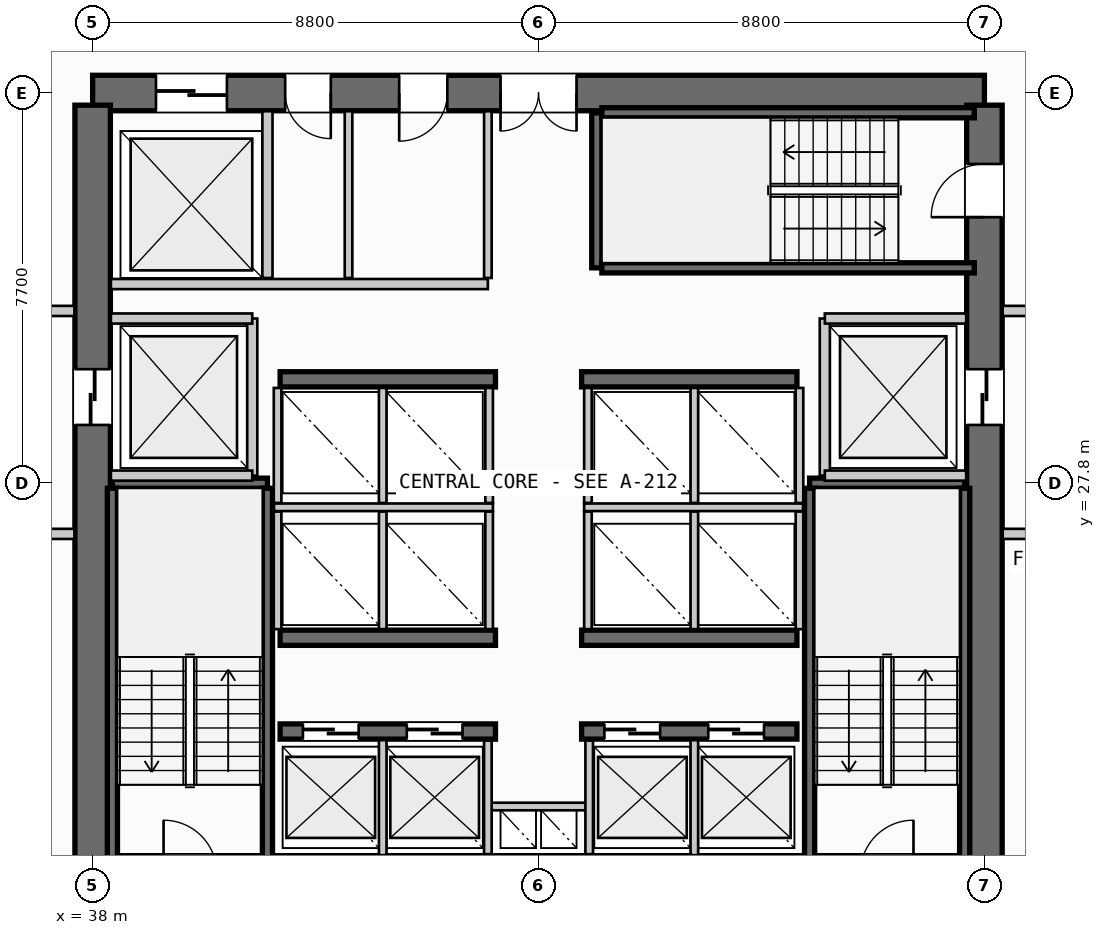
"""IFC4 building model, lengths in metres.
Left out: names, types, materials, properties, quantities, classifications, styles, units other than length and angle.
Written with IfcOpenShell. Run it as: python <this file> out.ifc"""

import sys

from ifc_helpers import new_model, si_unit, direction, frame, frame_2d, origin, place, context, subcontext, project, spatial, rectangle, extrude, source, transform, mapped, element, fill, save


model = new_model("IFC4")
c1 = context("Model", 3, precision=1e-05, world=origin(), true_north=direction((0.0, 1.0)))
c2 = subcontext(c1, "Body", "Model", "MODEL_VIEW")
j1 = project(units=[si_unit("LENGTHUNIT", "METRE"), si_unit("PLANEANGLEUNIT", "RADIAN")], contexts=[c1])
p1 = place(None, origin())
s1 = spatial("IfcSite", under=j1, at=p1, CompositionType="ELEMENT")
p2 = place(p1, origin())
s2 = spatial("IfcBuilding", under=s1, at=p2, CompositionType="ELEMENT")
p3 = place(p2, frame((0.0, 0.0, 89.2)))
s3 = spatial("IfcBuildingStorey", under=s2, at=p3, CompositionType="ELEMENT", Elevation=89.2)
p4 = place(p3, frame((38.0, 20.1, 0.0), z_axis=(0.0, 0.0, 1.0), x_axis=(1.0, 0.0, 0.0)))
e1 = element("IfcWall", 1, at=p4, inside=s3, PredefinedType="SHEAR", context=c2, shape_type="SweptSolid", body=[
    extrude(rectangle(XDim=17.6, YDim=0.7, at=frame_2d((8.8, 0.0))), origin(), (0.0, 0.0, 1.0), 3.35),
])
p5 = place(p4, frame((1.4, 0.0, 0.0)))
e2 = element("IfcOpeningElement", 2, at=p5, cuts=e1, PredefinedType="OPENING", context=c2, shape_type="SweptSolid", body=[
    extrude(rectangle(XDim=1.05, YDim=2.15, at=frame_2d((0.525, 1.075))), frame((0.0, 0.36, 0.0), z_axis=(0.0, -1.0, 0.0), x_axis=(1.0, 0.0, 0.0)), (0.0, 0.0, 1.0), 0.72),
])
p6 = place(p4, frame((15.15, 0.0, 0.0)))
e3 = element("IfcOpeningElement", 3, at=p6, cuts=e1, PredefinedType="OPENING", context=c2, shape_type="SweptSolid", body=[
    extrude(rectangle(XDim=1.05, YDim=2.15, at=frame_2d((0.525, 1.075))), frame((0.0, 0.36, 0.0), z_axis=(0.0, -1.0, 0.0), x_axis=(1.0, 0.0, 0.0)), (0.0, 0.0, 1.0), 0.72),
])
p7 = place(p3, frame((55.6, 35.5, 0.0), z_axis=(0.0, 0.0, 1.0), x_axis=(-1.0, 0.0, 0.0)))
e4 = element("IfcWall", 4, at=p7, inside=s3, PredefinedType="SHEAR", context=c2, shape_type="SweptSolid", body=[
    extrude(rectangle(XDim=17.6, YDim=0.7, at=frame_2d((8.8, 0.0))), origin(), (0.0, 0.0, 1.0), 3.35),
])
p8 = place(p7, frame((8.05, 0.0, 0.0)))
e5 = element("IfcOpeningElement", 5, at=p8, cuts=e4, PredefinedType="OPENING", context=c2, shape_type="SweptSolid", body=[
    extrude(rectangle(XDim=1.5, YDim=2.2, at=frame_2d((0.75, 1.1))), frame((0.0, 0.36, 0.0), z_axis=(0.0, -1.0, 0.0), x_axis=(1.0, 0.0, 0.0)), (0.0, 0.0, 1.0), 0.72),
])
p9 = place(p7, frame((14.95, 0.0, 0.0)))
e6 = element("IfcOpeningElement", 6, at=p9, cuts=e4, PredefinedType="OPENING", context=c2, shape_type="SweptSolid", body=[
    extrude(rectangle(XDim=1.4, YDim=2.3, at=frame_2d((0.7, 1.15))), frame((0.0, 0.36, 0.0), z_axis=(0.0, -1.0, 0.0), x_axis=(1.0, 0.0, 0.0)), (0.0, 0.0, 1.0), 0.72),
])
p10 = place(p7, frame((12.9, 0.0, 0.0)))
e7 = element("IfcOpeningElement", 7, at=p10, cuts=e4, PredefinedType="OPENING", context=c2, shape_type="SweptSolid", body=[
    extrude(rectangle(XDim=0.9, YDim=2.15, at=frame_2d((0.45, 1.075))), frame((0.0, 0.36, 0.0), z_axis=(0.0, -1.0, 0.0), x_axis=(1.0, 0.0, 0.0)), (0.0, 0.0, 1.0), 0.72),
])
p11 = place(p7, frame((10.6, 0.0, 0.0)))
e8 = element("IfcOpeningElement", 8, at=p11, cuts=e4, PredefinedType="OPENING", context=c2, shape_type="SweptSolid", body=[
    extrude(rectangle(XDim=0.95, YDim=2.15, at=frame_2d((0.475, 1.075))), frame((0.0, 0.36, 0.0), z_axis=(0.0, -1.0, 0.0), x_axis=(1.0, 0.0, 0.0)), (0.0, 0.0, 1.0), 0.72),
])
p12 = place(p3, frame((38.0, 35.26, 0.0), z_axis=(0.0, 0.0, 1.0), x_axis=(0.0, -1.0, 0.0)))
e9 = element("IfcWall", 9, at=p12, inside=s3, PredefinedType="SHEAR", context=c2, shape_type="SweptSolid", body=[
    extrude(rectangle(XDim=14.92, YDim=0.7, at=frame_2d((7.46, 0.0))), origin(), (0.0, 0.0, 1.0), 3.35),
])
p13 = place(p12, frame((5.21, 0.0, 0.0)))
e10 = element("IfcOpeningElement", 10, at=p13, cuts=e9, PredefinedType="OPENING", context=c2, shape_type="SweptSolid", body=[
    extrude(rectangle(XDim=1.1, YDim=2.2, at=frame_2d((0.55, 1.1))), frame((0.0, 0.36, 0.0), z_axis=(0.0, -1.0, 0.0), x_axis=(1.0, 0.0, 0.0)), (0.0, 0.0, 1.0), 0.72),
])
p14 = place(p3, frame((55.6, 20.34, 0.0), z_axis=(0.0, 0.0, 1.0), x_axis=(0.0, 1.0, 0.0)))
e11 = element("IfcWall", 11, at=p14, inside=s3, PredefinedType="SHEAR", context=c2, shape_type="SweptSolid", body=[
    extrude(rectangle(XDim=14.92, YDim=0.7, at=frame_2d((7.46, 0.0))), origin(), (0.0, 0.0, 1.0), 3.35),
])
p15 = place(p14, frame((12.71, 0.0, 0.0)))
e12 = element("IfcOpeningElement", 12, at=p15, cuts=e11, PredefinedType="OPENING", context=c2, shape_type="SweptSolid", body=[
    extrude(rectangle(XDim=1.05, YDim=2.15, at=frame_2d((0.525, 1.075))), frame((0.0, 0.36, 0.0), z_axis=(0.0, -1.0, 0.0), x_axis=(1.0, 0.0, 0.0)), (0.0, 0.0, 1.0), 0.72),
])
p16 = place(p14, frame((8.61, 0.0, 0.0)))
e13 = element("IfcOpeningElement", 13, at=p16, cuts=e11, PredefinedType="OPENING", context=c2, shape_type="SweptSolid", body=[
    extrude(rectangle(XDim=1.1, YDim=2.2, at=frame_2d((0.55, 1.1))), frame((0.0, 0.36, 0.0), z_axis=(0.0, -1.0, 0.0), x_axis=(1.0, 0.0, 0.0)), (0.0, 0.0, 1.0), 0.72),
])
p17 = place(p3, frame((41.7, 22.9, 0.0), z_axis=(0.0, 0.0, 1.0), x_axis=(1.0, 0.0, 0.0)))
e14 = element("IfcWall", 14, at=p17, inside=s3, PredefinedType="SHEAR", context=c2, shape_type="SweptSolid", body=[
    extrude(rectangle(XDim=4.25, YDim=0.3, at=frame_2d((2.125, 0.0))), origin(), (0.0, 0.0, 1.0), 3.35),
])
p18 = place(p17, frame((0.45, 0.0, 0.0)))
e15 = element("IfcOpeningElement", 15, at=p18, cuts=e14, PredefinedType="OPENING", context=c2, shape_type="SweptSolid", body=[
    extrude(rectangle(XDim=1.1, YDim=2.2, at=frame_2d((0.55, 1.1))), frame((0.0, 0.16, 0.0), z_axis=(0.0, -1.0, 0.0), x_axis=(1.0, 0.0, 0.0)), (0.0, 0.0, 1.0), 0.32),
])
p19 = place(p17, frame((2.5, 0.0, 0.0)))
e16 = element("IfcOpeningElement", 16, at=p19, cuts=e14, PredefinedType="OPENING", context=c2, shape_type="SweptSolid", body=[
    extrude(rectangle(XDim=1.1, YDim=2.2, at=frame_2d((0.55, 1.1))), frame((0.0, 0.16, 0.0), z_axis=(0.0, -1.0, 0.0), x_axis=(1.0, 0.0, 0.0)), (0.0, 0.0, 1.0), 0.32),
])
p20 = place(p3, frame((47.65, 22.9, 0.0), z_axis=(0.0, 0.0, 1.0), x_axis=(1.0, 0.0, 0.0)))
e17 = element("IfcWall", 17, at=p20, inside=s3, PredefinedType="SHEAR", context=c2, shape_type="SweptSolid", body=[
    extrude(rectangle(XDim=4.25, YDim=0.3, at=frame_2d((2.125, 0.0))), origin(), (0.0, 0.0, 1.0), 3.35),
])
p21 = place(p20, frame((0.45, 0.0, 0.0)))
e18 = element("IfcOpeningElement", 18, at=p21, cuts=e17, PredefinedType="OPENING", context=c2, shape_type="SweptSolid", body=[
    extrude(rectangle(XDim=1.1, YDim=2.2, at=frame_2d((0.55, 1.1))), frame((0.0, 0.16, 0.0), z_axis=(0.0, -1.0, 0.0), x_axis=(1.0, 0.0, 0.0)), (0.0, 0.0, 1.0), 0.32),
])
p22 = place(p20, frame((2.5, 0.0, 0.0)))
e19 = element("IfcOpeningElement", 19, at=p22, cuts=e17, PredefinedType="OPENING", context=c2, shape_type="SweptSolid", body=[
    extrude(rectangle(XDim=1.1, YDim=2.2, at=frame_2d((0.55, 1.1))), frame((0.0, 0.16, 0.0), z_axis=(0.0, -1.0, 0.0), x_axis=(1.0, 0.0, 0.0)), (0.0, 0.0, 1.0), 0.32),
])
for number, where, z_axis, x_axis in (
    (20, (41.7, 24.75, 0.0), (0.0, 0.0, 1.0), (1.0, 0.0, 0.0)),
    (21, (47.65, 24.75, 0.0), (0.0, 0.0, 1.0), (1.0, 0.0, 0.0)),
    (22, (41.7, 29.85, 0.0), (0.0, 0.0, 1.0), (1.0, 0.0, 0.0)),
    (23, (47.65, 29.85, 0.0), (0.0, 0.0, 1.0), (1.0, 0.0, 0.0)),
):
    element("IfcWall", number, at=place(p3, frame(where, z_axis=z_axis, x_axis=x_axis)), inside=s3, PredefinedType="SHEAR", context=c2, shape_type="SweptSolid", body=[
        extrude(rectangle(XDim=4.25, YDim=0.3, at=frame_2d((2.125, 0.0))), origin(), (0.0, 0.0, 1.0), 3.35),
    ])
p23 = place(p3, frame((38.39, 27.8, 0.0), z_axis=(0.0, 0.0, 1.0), x_axis=(1.0, 0.0, 0.0)))
e24 = element("IfcWall", 24, at=p23, inside=s3, PredefinedType="SHEAR", context=c2, shape_type="SweptSolid", body=[
    extrude(rectangle(XDim=3.06, YDim=0.2, at=frame_2d((1.53, 0.0))), origin(), (0.0, 0.0, 1.0), 3.35),
])
for number, where, z_axis, x_axis in (
    (25, (41.45, 27.7, 0.0), (0.0, 0.0, 1.0), (0.0, -1.0, 0.0)),
    (26, (38.39, 20.35, 0.0), (0.0, 0.0, 1.0), (0.0, 1.0, 0.0)),
):
    element("IfcWall", number, at=place(p3, frame(where, z_axis=z_axis, x_axis=x_axis)), inside=s3, PredefinedType="SHEAR", context=c2, shape_type="SweptSolid", body=[
        extrude(rectangle(XDim=7.35, YDim=0.2, at=frame_2d((3.675, 0.0))), origin(), (0.0, 0.0, 1.0), 3.35),
    ])
p24 = place(p3, frame((52.15, 27.8, 0.0), z_axis=(0.0, 0.0, 1.0), x_axis=(1.0, 0.0, 0.0)))
e27 = element("IfcWall", 27, at=p24, inside=s3, PredefinedType="SHEAR", context=c2, shape_type="SweptSolid", body=[
    extrude(rectangle(XDim=3.06, YDim=0.2, at=frame_2d((1.53, 0.0))), origin(), (0.0, 0.0, 1.0), 3.35),
])
for number, where, z_axis, x_axis in (
    (28, (55.21, 27.7, 0.0), (0.0, 0.0, 1.0), (0.0, -1.0, 0.0)),
    (29, (52.15, 20.35, 0.0), (0.0, 0.0, 1.0), (0.0, 1.0, 0.0)),
):
    element("IfcWall", number, at=place(p3, frame(where, z_axis=z_axis, x_axis=x_axis)), inside=s3, PredefinedType="SHEAR", context=c2, shape_type="SweptSolid", body=[
        extrude(rectangle(XDim=7.35, YDim=0.2, at=frame_2d((3.675, 0.0))), origin(), (0.0, 0.0, 1.0), 3.35),
    ])
p25 = place(p3, frame((47.95, 32.05, 0.0), z_axis=(0.0, 0.0, 1.0), x_axis=(0.0, 1.0, 0.0)))
e30 = element("IfcWall", 30, at=p25, inside=s3, PredefinedType="SHEAR", context=c2, shape_type="SweptSolid", body=[
    extrude(rectangle(XDim=3.06, YDim=0.2, at=frame_2d((1.53, 0.0))), origin(), (0.0, 0.0, 1.0), 3.35),
])
for number, where, z_axis, x_axis in (
    (31, (48.05, 35.11, 0.0), (0.0, 0.0, 1.0), (1.0, 0.0, 0.0)),
    (32, (55.4, 32.05, 0.0), (0.0, 0.0, 1.0), (-1.0, 0.0, 0.0)),
):
    element("IfcWall", number, at=place(p3, frame(where, z_axis=z_axis, x_axis=x_axis)), inside=s3, PredefinedType="SHEAR", context=c2, shape_type="SweptSolid", body=[
        extrude(rectangle(XDim=7.35, YDim=0.2, at=frame_2d((3.675, 0.0))), origin(), (0.0, 0.0, 1.0), 3.35),
    ])
p26 = place(p3, frame((45.8, 21.42, 0.0), z_axis=(0.0, 0.0, 1.0), x_axis=(1.0, 0.0, 0.0)))
e33 = element("IfcWall", 33, at=p26, inside=s3, PredefinedType="PARTITIONING", context=c2, shape_type="SweptSolid", body=[
    extrude(rectangle(XDim=2.0, YDim=0.15, at=frame_2d((1.0, 0.0))), origin(), (0.0, 0.0, 1.0), 2.28),
])
for number, where, z_axis, x_axis in (
    (34, (45.8, 20.48, 0.0), (0.0, 0.0, 1.0), (0.0, 1.0, 0.0)),
    (35, (47.8, 20.48, 0.0), (0.0, 0.0, 1.0), (0.0, 1.0, 0.0)),
):
    element("IfcWall", number, at=place(p3, frame(where, z_axis=z_axis, x_axis=x_axis)), inside=s3, PredefinedType="PARTITIONING", context=c2, shape_type="SweptSolid", body=[
        extrude(rectangle(XDim=2.24, YDim=0.15, at=frame_2d((1.12, 0.0))), origin(), (0.0, 0.0, 1.0), 2.28),
    ])
p27 = place(p3, frame((41.15, 27.95, 0.0), z_axis=(0.0, 0.0, 1.0), x_axis=(0.0, 1.0, 0.0)))
e36 = element("IfcWall", 36, at=p27, inside=s3, PredefinedType="PARTITIONING", context=c2, shape_type="SweptSolid", body=[
    extrude(rectangle(XDim=3.1, YDim=0.2, at=frame_2d((1.55, 0.0))), origin(), (0.0, 0.0, 1.0), 2.28),
])
for number, where, z_axis, x_axis in (
    (37, (38.36, 27.95, 0.0), (0.0, 0.0, 1.0), (1.0, 0.0, 0.0)),
    (38, (38.36, 31.05, 0.0), (0.0, 0.0, 1.0), (1.0, 0.0, 0.0)),
):
    element("IfcWall", number, at=place(p3, frame(where, z_axis=z_axis, x_axis=x_axis)), inside=s3, PredefinedType="PARTITIONING", context=c2, shape_type="SweptSolid", body=[
        extrude(rectangle(XDim=2.79, YDim=0.2, at=frame_2d((1.395, 0.0))), origin(), (0.0, 0.0, 1.0), 2.28),
    ])
for number, where, z_axis, x_axis in (
    (39, (34.5, 26.8, 0.0), (0.0, 0.0, 1.0), (1.0, 0.0, 0.0)),
    (40, (34.5, 31.2, 0.0), (0.0, 0.0, 1.0), (1.0, 0.0, 0.0)),
):
    element("IfcWall", number, at=place(p3, frame(where, z_axis=z_axis, x_axis=x_axis)), inside=s3, PredefinedType="PARTITIONING", context=c2, shape_type="SweptSolid", body=[
        extrude(rectangle(XDim=3.14, YDim=0.2, at=frame_2d((1.57, 0.0))), origin(), (0.0, 0.0, 1.0), 2.28),
    ])
p28 = place(p3, frame((52.45, 27.95, 0.0), z_axis=(0.0, 0.0, 1.0), x_axis=(0.0, 1.0, 0.0)))
e41 = element("IfcWall", 41, at=p28, inside=s3, PredefinedType="PARTITIONING", context=c2, shape_type="SweptSolid", body=[
    extrude(rectangle(XDim=3.1, YDim=0.2, at=frame_2d((1.55, 0.0))), origin(), (0.0, 0.0, 1.0), 2.28),
])
for number, where, z_axis, x_axis in (
    (42, (52.45, 27.95, 0.0), (0.0, 0.0, 1.0), (1.0, 0.0, 0.0)),
    (43, (52.45, 31.05, 0.0), (0.0, 0.0, 1.0), (1.0, 0.0, 0.0)),
):
    element("IfcWall", number, at=place(p3, frame(where, z_axis=z_axis, x_axis=x_axis)), inside=s3, PredefinedType="PARTITIONING", context=c2, shape_type="SweptSolid", body=[
        extrude(rectangle(XDim=2.79, YDim=0.2, at=frame_2d((1.395, 0.0))), origin(), (0.0, 0.0, 1.0), 2.28),
    ])
for number, where, z_axis, x_axis in (
    (44, (55.96, 26.8, 0.0), (0.0, 0.0, 1.0), (1.0, 0.0, 0.0)),
    (45, (55.96, 31.2, 0.0), (0.0, 0.0, 1.0), (1.0, 0.0, 0.0)),
):
    element("IfcWall", number, at=place(p3, frame(where, z_axis=z_axis, x_axis=x_axis)), inside=s3, PredefinedType="PARTITIONING", context=c2, shape_type="SweptSolid", body=[
        extrude(rectangle(XDim=3.14, YDim=0.2, at=frame_2d((1.57, 0.0))), origin(), (0.0, 0.0, 1.0), 2.28),
    ])
for number, where, z_axis, x_axis in (
    (46, (43.725, 20.46, 0.0), (0.0, 0.0, 1.0), (0.0, 1.0, 0.0)),
    (47, (49.875, 20.46, 0.0), (0.0, 0.0, 1.0), (0.0, 1.0, 0.0)),
):
    element("IfcWall", number, at=place(p3, frame(where, z_axis=z_axis, x_axis=x_axis)), inside=s3, PredefinedType="PARTITIONING", context=c2, shape_type="SweptSolid", body=[
        extrude(rectangle(XDim=2.27, YDim=0.15, at=frame_2d((1.135, 0.0))), origin(), (0.0, 0.0, 1.0), 2.28),
    ])
p29 = place(p3, frame((41.58, 27.325, 0.0), z_axis=(0.0, 0.0, 1.0), x_axis=(1.0, 0.0, 0.0)))
e48 = element("IfcWall", 48, at=p29, inside=s3, PredefinedType="PARTITIONING", context=c2, shape_type="SweptSolid", body=[
    extrude(rectangle(XDim=4.32, YDim=0.15, at=frame_2d((2.16, 0.0))), origin(), (0.0, 0.0, 1.0), 2.28),
])
p30 = place(p3, frame((47.7, 27.325, 0.0), z_axis=(0.0, 0.0, 1.0), x_axis=(1.0, 0.0, 0.0)))
e49 = element("IfcWall", 49, at=p30, inside=s3, PredefinedType="PARTITIONING", context=c2, shape_type="SweptSolid", body=[
    extrude(rectangle(XDim=4.32, YDim=0.15, at=frame_2d((2.16, 0.0))), origin(), (0.0, 0.0, 1.0), 2.28),
])
for number, where, z_axis, x_axis in (
    (50, (41.65, 24.92, 0.0), (0.0, 0.0, 1.0), (0.0, 1.0, 0.0)),
    (51, (43.725, 24.92, 0.0), (0.0, 0.0, 1.0), (0.0, 1.0, 0.0)),
    (52, (45.825, 24.92, 0.0), (0.0, 0.0, 1.0), (0.0, 1.0, 0.0)),
    (53, (47.775, 24.92, 0.0), (0.0, 0.0, 1.0), (0.0, 1.0, 0.0)),
    (54, (49.875, 24.92, 0.0), (0.0, 0.0, 1.0), (0.0, 1.0, 0.0)),
    (55, (51.95, 24.92, 0.0), (0.0, 0.0, 1.0), (0.0, 1.0, 0.0)),
):
    element("IfcWall", number, at=place(p3, frame(where, z_axis=z_axis, x_axis=x_axis)), inside=s3, PredefinedType="PARTITIONING", context=c2, shape_type="SweptSolid", body=[
        extrude(rectangle(XDim=2.32, YDim=0.15, at=frame_2d((1.16, 0.0))), origin(), (0.0, 0.0, 1.0), 2.28),
    ])
for number, where, z_axis, x_axis in (
    (56, (41.65, 27.41, 0.0), (0.0, 0.0, 1.0), (0.0, 1.0, 0.0)),
    (57, (43.725, 27.41, 0.0), (0.0, 0.0, 1.0), (0.0, 1.0, 0.0)),
    (58, (45.825, 27.41, 0.0), (0.0, 0.0, 1.0), (0.0, 1.0, 0.0)),
    (59, (47.775, 27.41, 0.0), (0.0, 0.0, 1.0), (0.0, 1.0, 0.0)),
    (60, (49.875, 27.41, 0.0), (0.0, 0.0, 1.0), (0.0, 1.0, 0.0)),
    (61, (51.95, 27.41, 0.0), (0.0, 0.0, 1.0), (0.0, 1.0, 0.0)),
):
    element("IfcWall", number, at=place(p3, frame(where, z_axis=z_axis, x_axis=x_axis)), inside=s3, PredefinedType="PARTITIONING", context=c2, shape_type="SweptSolid", body=[
        extrude(rectangle(XDim=2.27, YDim=0.15, at=frame_2d((1.135, 0.0))), origin(), (0.0, 0.0, 1.0), 2.28),
    ])
p31 = place(p3, frame((41.45, 31.85, 0.0), z_axis=(0.0, 0.0, 1.0), x_axis=(0.0, 1.0, 0.0)))
e62 = element("IfcWall", 62, at=p31, inside=s3, PredefinedType="PARTITIONING", context=c2, shape_type="SweptSolid", body=[
    extrude(rectangle(XDim=3.29, YDim=0.2, at=frame_2d((1.645, 0.0))), origin(), (0.0, 0.0, 1.0), 2.28),
])
p32 = place(p3, frame((38.36, 31.73, 0.0), z_axis=(0.0, 0.0, 1.0), x_axis=(1.0, 0.0, 0.0)))
e63 = element("IfcWall", 63, at=p32, inside=s3, PredefinedType="PARTITIONING", context=c2, shape_type="SweptSolid", body=[
    extrude(rectangle(XDim=7.44, YDim=0.2, at=frame_2d((3.72, 0.0))), origin(), (0.0, 0.0, 1.0), 2.28),
])
p33 = place(p3, frame((45.8, 31.85, 0.0), z_axis=(0.0, 0.0, 1.0), x_axis=(0.0, 1.0, 0.0)))
e64 = element("IfcWall", 64, at=p33, inside=s3, PredefinedType="PARTITIONING", context=c2, shape_type="SweptSolid", body=[
    extrude(rectangle(XDim=3.29, YDim=0.15, at=frame_2d((1.645, 0.0))), origin(), (0.0, 0.0, 1.0), 2.28),
])
p34 = place(p3, frame((43.05, 31.85, 0.0), z_axis=(0.0, 0.0, 1.0), x_axis=(0.0, 1.0, 0.0)))
e65 = element("IfcWall", 65, at=p34, inside=s3, PredefinedType="PLUMBINGWALL", context=c2, shape_type="SweptSolid", body=[
    extrude(rectangle(XDim=3.29, YDim=0.15, at=frame_2d((1.645, 0.0))), origin(), (0.0, 0.0, 1.0), 2.28),
])
m1 = source(origin(), c2, "Body", "SweptSolid", [
    extrude(rectangle(XDim=1.05, YDim=2.15, at=frame_2d((0.525, 1.075))), frame((0.0, 0.025, 0.0), z_axis=(0.0, -1.0, 0.0), x_axis=(1.0, 0.0, 0.0)), (0.0, 0.0, 1.0), 0.05),
])
p35 = place(p15, origin())
e66 = element("IfcDoor", 66, at=p35, inside=s3, OperationType="SINGLE_SWING_LEFT", PredefinedType="DOOR", context=c2, shape_type="MappedRepresentation", body=[
    mapped(m1, transform((0.0, 0.0, 0.0), scale=1.0)),
])
fill(e12, e66)
m2 = source(origin(), c2, "Body", "SweptSolid", [
    extrude(rectangle(XDim=1.5, YDim=2.2, at=frame_2d((0.75, 1.1))), frame((0.0, 0.025, 0.0), z_axis=(0.0, -1.0, 0.0), x_axis=(1.0, 0.0, 0.0)), (0.0, 0.0, 1.0), 0.05),
])
p36 = place(p8, origin())
e67 = element("IfcDoor", 67, at=p36, inside=s3, OperationType="DOUBLE_DOOR_SINGLE_SWING", PredefinedType="DOOR", context=c2, shape_type="MappedRepresentation", body=[
    mapped(m2, transform((0.0, 0.0, 0.0), scale=1.0)),
])
fill(e5, e67)
m3 = source(origin(), c2, "Body", "SweptSolid", [
    extrude(rectangle(XDim=1.1, YDim=2.2, at=frame_2d((0.55, 1.1))), frame((0.0, 0.025, 0.0), z_axis=(0.0, -1.0, 0.0), x_axis=(1.0, 0.0, 0.0)), (0.0, 0.0, 1.0), 0.05),
])
p37 = place(p13, origin())
e68 = element("IfcDoor", 68, at=p37, inside=s3, OperationType="SLIDING_TO_LEFT", PredefinedType="DOOR", context=c2, shape_type="MappedRepresentation", body=[
    mapped(m3, transform((0.0, 0.0, 0.0), scale=1.0)),
])
fill(e10, e68)
p38 = place(p16, origin())
e69 = element("IfcDoor", 69, at=p38, inside=s3, OperationType="SLIDING_TO_RIGHT", PredefinedType="DOOR", context=c2, shape_type="MappedRepresentation", body=[
    mapped(m3, transform((0.0, 0.0, 0.0), scale=1.0)),
])
fill(e13, e69)
p39 = place(p18, origin())
e70 = element("IfcDoor", 70, at=p39, inside=s3, OperationType="SLIDING_TO_LEFT", PredefinedType="DOOR", context=c2, shape_type="MappedRepresentation", body=[
    mapped(m3, transform((0.0, 0.0, 0.0), scale=1.0)),
])
fill(e15, e70)
p40 = place(p19, origin())
e71 = element("IfcDoor", 71, at=p40, inside=s3, OperationType="SLIDING_TO_LEFT", PredefinedType="DOOR", context=c2, shape_type="MappedRepresentation", body=[
    mapped(m3, transform((0.0, 0.0, 0.0), scale=1.0)),
])
fill(e16, e71)
p41 = place(p21, origin())
e72 = element("IfcDoor", 72, at=p41, inside=s3, OperationType="SLIDING_TO_LEFT", PredefinedType="DOOR", context=c2, shape_type="MappedRepresentation", body=[
    mapped(m3, transform((0.0, 0.0, 0.0), scale=1.0)),
])
fill(e18, e72)
p42 = place(p22, origin())
e73 = element("IfcDoor", 73, at=p42, inside=s3, OperationType="SLIDING_TO_LEFT", PredefinedType="DOOR", context=c2, shape_type="MappedRepresentation", body=[
    mapped(m3, transform((0.0, 0.0, 0.0), scale=1.0)),
])
fill(e19, e73)
m4 = source(origin(), c2, "Body", "SweptSolid", [
    extrude(rectangle(XDim=1.4, YDim=2.3, at=frame_2d((0.7, 1.15))), frame((0.0, 0.025, 0.0), z_axis=(0.0, -1.0, 0.0), x_axis=(1.0, 0.0, 0.0)), (0.0, 0.0, 1.0), 0.05),
])
p43 = place(p9, origin())
e74 = element("IfcDoor", 74, at=p43, inside=s3, OperationType="SLIDING_TO_RIGHT", PredefinedType="DOOR", context=c2, shape_type="MappedRepresentation", body=[
    mapped(m4, transform((0.0, 0.0, 0.0), scale=1.0)),
])
fill(e6, e74)
m5 = source(origin(), c2, "Body", "SweptSolid", [
    extrude(rectangle(XDim=0.9, YDim=2.15, at=frame_2d((0.45, 1.075))), frame((0.0, 0.025, 0.0), z_axis=(0.0, -1.0, 0.0), x_axis=(1.0, 0.0, 0.0)), (0.0, 0.0, 1.0), 0.05),
])
p44 = place(p10, origin())
e75 = element("IfcDoor", 75, at=p44, inside=s3, OperationType="SINGLE_SWING_LEFT", PredefinedType="DOOR", context=c2, shape_type="MappedRepresentation", body=[
    mapped(m5, transform((0.0, 0.0, 0.0), scale=1.0)),
])
fill(e7, e75)
m6 = source(origin(), c2, "Body", "SweptSolid", [
    extrude(rectangle(XDim=0.95, YDim=2.15, at=frame_2d((0.475, 1.075))), frame((0.0, 0.025, 0.0), z_axis=(0.0, -1.0, 0.0), x_axis=(1.0, 0.0, 0.0)), (0.0, 0.0, 1.0), 0.05),
])
p45 = place(p11, origin())
e76 = element("IfcDoor", 76, at=p45, inside=s3, OperationType="SINGLE_SWING_RIGHT", PredefinedType="DOOR", context=c2, shape_type="MappedRepresentation", body=[
    mapped(m6, transform((0.0, 0.0, 0.0), scale=1.0)),
])
fill(e8, e76)
save(model, sys.argv[1])
